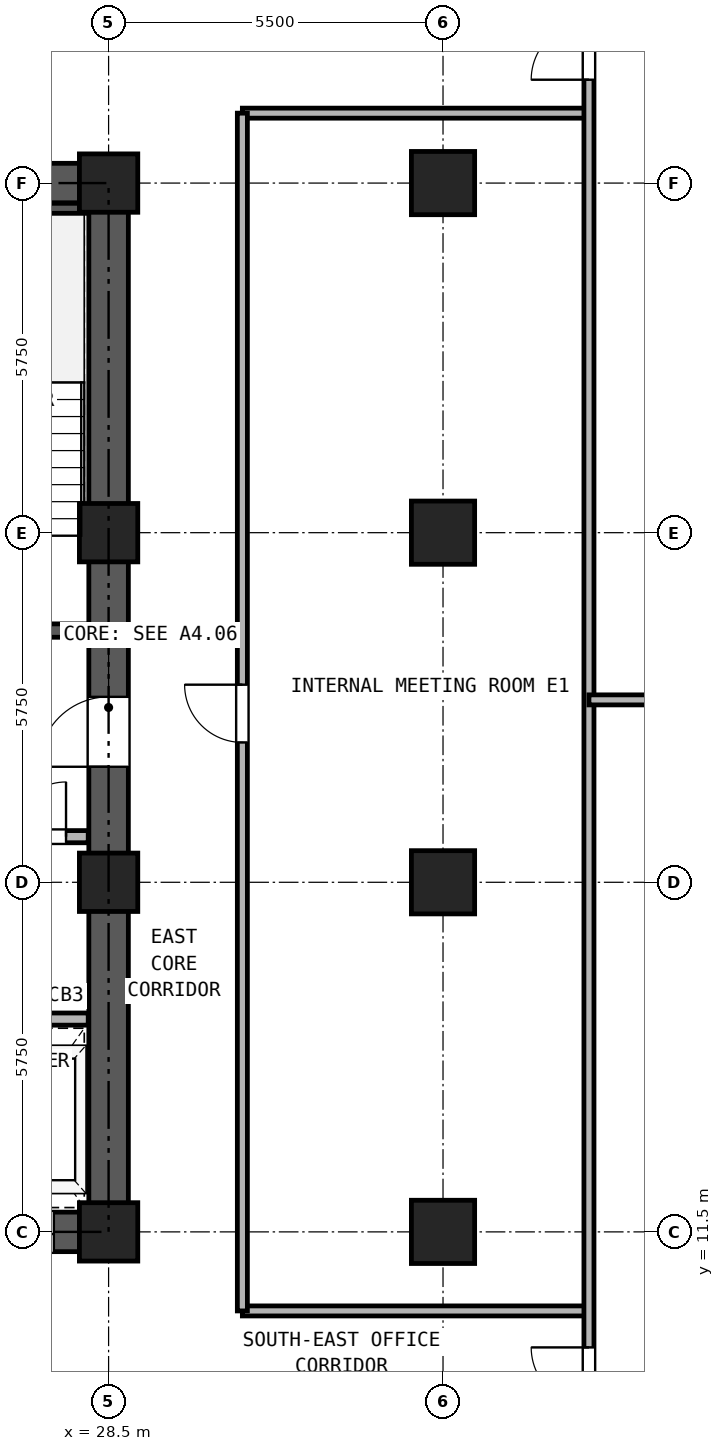
"""IFC4 building model, lengths in metres.
Left out: names, types, materials, properties, quantities, classifications, styles, units other than length and angle.
Written with IfcOpenShell. Run it as: python <this file> out.ifc"""

import sys

from ifc_helpers import new_model, si_unit, direction, frame, frame_2d, origin, origin_2d, place, context, subcontext, project, spatial, rectangle, hollow_rectangle, extrude, source, transform, mapped, element, fill, save


model = new_model("IFC4")
c1 = context("Model", 3, precision=1e-05, world=origin(), true_north=direction((0.0, 1.0)))
c2 = subcontext(c1, "Body", "Model", "MODEL_VIEW")
j1 = project(units=[si_unit("LENGTHUNIT", "METRE"), si_unit("PLANEANGLEUNIT", "RADIAN")], contexts=[c1])
p1 = place(None, origin())
s1 = spatial("IfcSite", under=j1, at=p1, CompositionType="ELEMENT")
p2 = place(p1, origin())
s2 = spatial("IfcBuilding", under=s1, at=p2, CompositionType="ELEMENT")
p3 = place(p2, frame((0.0, 0.0, 47.7)))
s3 = spatial("IfcBuildingStorey", under=s2, at=p3, CompositionType="ELEMENT", Elevation=47.7)
m1 = source(origin(), c2, "Body", "SweptSolid", [
    extrude(hollow_rectangle(XDim=0.96, YDim=0.96, WallThickness=0.06, at=origin_2d()), origin(), (0.0, 0.0, 1.0), 3.32),
])
for number, where, z_axis, x_axis in (
    (1, (28.5, 11.5, 0.0), (0.0, 0.0, 1.0), (1.0, 0.0, 0.0)),
    (2, (28.5, 17.25, 0.0), (0.0, 0.0, 1.0), (1.0, 0.0, 0.0)),
    (3, (28.5, 23.0, 0.0), (0.0, 0.0, 1.0), (1.0, 0.0, 0.0)),
    (4, (28.5, 28.75, 0.0), (0.0, 0.0, 1.0), (1.0, 0.0, 0.0)),
):
    element("IfcColumn", number, at=place(p3, frame(where, z_axis=z_axis, x_axis=x_axis)), inside=s3, PredefinedType="COLUMN", context=c2, shape_type="MappedRepresentation", body=[
        mapped(m1, transform((0.0, 0.0, 0.0), x_axis=(1.0, 0.0, 0.0), y_axis=(0.0, 1.0, 0.0), z_axis=(0.0, 0.0, 1.0), scale=1.0)),
    ])
m2 = source(origin(), c2, "Body", "SweptSolid", [
    extrude(hollow_rectangle(XDim=1.04, YDim=1.04, WallThickness=0.065, at=origin_2d()), origin(), (0.0, 0.0, 1.0), 3.32),
])
for number, where, z_axis, x_axis in (
    (5, (34.0, 11.5, 0.0), (0.0, 0.0, 1.0), (1.0, 0.0, 0.0)),
    (6, (34.0, 17.25, 0.0), (0.0, 0.0, 1.0), (1.0, 0.0, 0.0)),
    (7, (34.0, 23.0, 0.0), (0.0, 0.0, 1.0), (1.0, 0.0, 0.0)),
    (8, (34.0, 28.75, 0.0), (0.0, 0.0, 1.0), (1.0, 0.0, 0.0)),
):
    element("IfcColumn", number, at=place(p3, frame(where, z_axis=z_axis, x_axis=x_axis)), inside=s3, PredefinedType="COLUMN", context=c2, shape_type="MappedRepresentation", body=[
        mapped(m2, transform((0.0, 0.0, 0.0), x_axis=(1.0, 0.0, 0.0), y_axis=(0.0, 1.0, 0.0), z_axis=(0.0, 0.0, 1.0), scale=1.0)),
    ])
p4 = place(p3, frame((18.175, 11.5, 0.0), z_axis=(0.0, 0.0, 1.0), x_axis=(1.0, 0.0, 0.0)))
e9 = element("IfcWall", 9, at=p4, inside=s3, PredefinedType="SHEAR", context=c2, shape_type="SweptSolid", body=[
    extrude(rectangle(XDim=10.65, YDim=0.65, at=frame_2d((5.325, 0.0))), origin(), (0.0, 0.0, 1.0), 3.32),
])
p5 = place(p4, frame((1.195, 0.0, 0.0)))
e10 = element("IfcOpeningElement", 10, at=p5, cuts=e9, PredefinedType="OPENING", context=c2, shape_type="SweptSolid", body=[
    extrude(rectangle(XDim=1.1, YDim=2.25, at=frame_2d((0.55, 1.125))), frame((0.0, 0.335, 0.0), z_axis=(0.0, -1.0, 0.0), x_axis=(1.0, 0.0, 0.0)), (0.0, 0.0, 1.0), 0.67),
])
p6 = place(p4, frame((3.495, 0.0, 0.0)))
e11 = element("IfcOpeningElement", 11, at=p6, cuts=e9, PredefinedType="OPENING", context=c2, shape_type="SweptSolid", body=[
    extrude(rectangle(XDim=1.1, YDim=2.25, at=frame_2d((0.55, 1.125))), frame((0.0, 0.335, 0.0), z_axis=(0.0, -1.0, 0.0), x_axis=(1.0, 0.0, 0.0)), (0.0, 0.0, 1.0), 0.67),
])
p7 = place(p4, frame((5.925, 0.0, 0.0)))
e12 = element("IfcOpeningElement", 12, at=p7, cuts=e9, PredefinedType="OPENING", context=c2, shape_type="SweptSolid", body=[
    extrude(rectangle(XDim=1.1, YDim=2.25, at=frame_2d((0.55, 1.125))), frame((0.0, 0.335, 0.0), z_axis=(0.0, -1.0, 0.0), x_axis=(1.0, 0.0, 0.0)), (0.0, 0.0, 1.0), 0.67),
])
p8 = place(p4, frame((8.325, 0.0, 0.0)))
e13 = element("IfcOpeningElement", 13, at=p8, cuts=e9, PredefinedType="OPENING", context=c2, shape_type="SweptSolid", body=[
    extrude(rectangle(XDim=1.1, YDim=2.25, at=frame_2d((0.55, 1.125))), frame((0.0, 0.335, 0.0), z_axis=(0.0, -1.0, 0.0), x_axis=(1.0, 0.0, 0.0)), (0.0, 0.0, 1.0), 0.67),
])
p9 = place(p3, frame((18.175, 28.75, 0.0), z_axis=(0.0, 0.0, 1.0), x_axis=(1.0, 0.0, 0.0)))
e14 = element("IfcWall", 14, at=p9, inside=s3, PredefinedType="SHEAR", context=c2, shape_type="SweptSolid", body=[
    extrude(rectangle(XDim=10.65, YDim=0.65, at=frame_2d((5.325, 0.0))), origin(), (0.0, 0.0, 1.0), 3.32),
])
p10 = place(p9, frame((4.205, 0.0, 0.0)))
e15 = element("IfcOpeningElement", 15, at=p10, cuts=e14, PredefinedType="OPENING", context=c2, shape_type="SweptSolid", body=[
    extrude(rectangle(XDim=0.9, YDim=2.05, at=frame_2d((0.45, 1.025))), frame((0.0, 0.335, 0.0), z_axis=(0.0, -1.0, 0.0), x_axis=(1.0, 0.0, 0.0)), (0.0, 0.0, 1.0), 0.67),
])
p11 = place(p9, frame((5.745, 0.0, 0.0)))
e16 = element("IfcOpeningElement", 16, at=p11, cuts=e14, PredefinedType="OPENING", context=c2, shape_type="SweptSolid", body=[
    extrude(rectangle(XDim=0.9, YDim=2.05, at=frame_2d((0.45, 1.025))), frame((0.0, 0.335, 0.0), z_axis=(0.0, -1.0, 0.0), x_axis=(1.0, 0.0, 0.0)), (0.0, 0.0, 1.0), 0.67),
])
p12 = place(p3, frame((28.5, 11.825, 0.0), z_axis=(0.0, 0.0, 1.0), x_axis=(0.0, 1.0, 0.0)))
e17 = element("IfcWall", 17, at=p12, inside=s3, PredefinedType="SHEAR", context=c2, shape_type="SweptSolid", body=[
    extrude(rectangle(XDim=16.6, YDim=0.65, at=frame_2d((8.3, 0.0))), origin(), (0.0, 0.0, 1.0), 3.32),
])
p13 = place(p12, frame((7.325, 0.0, 0.0)))
e18 = element("IfcOpeningElement", 18, at=p13, cuts=e17, PredefinedType="OPENING", context=c2, shape_type="SweptSolid", body=[
    extrude(rectangle(XDim=1.15, YDim=2.2, at=frame_2d((0.575, 1.1))), frame((0.0, 0.335, 0.0), z_axis=(0.0, -1.0, 0.0), x_axis=(1.0, 0.0, 0.0)), (0.0, 0.0, 1.0), 0.67),
])
p14 = place(p3, frame((25.13, 28.335, 0.0), z_axis=(0.0, 0.0, 1.0), x_axis=(1.0, 0.0, 0.0)))
e19 = element("IfcWall", 19, at=p14, inside=s3, PredefinedType="PARTITIONING", context=c2, shape_type="SweptSolid", body=[
    extrude(rectangle(XDim=3.035, YDim=0.165, at=frame_2d((1.518, 0.0))), origin(), (0.0, 0.0, 1.0), 3.32),
])
p15 = place(p3, frame((25.13, 21.39, 0.0), z_axis=(0.0, 0.0, 1.0), x_axis=(1.0, 0.0, 0.0)))
e20 = element("IfcWall", 20, at=p15, inside=s3, PredefinedType="SOLIDWALL", context=c2, shape_type="SweptSolid", body=[
    extrude(rectangle(XDim=3.035, YDim=0.22, at=frame_2d((1.518, 0.0))), origin(), (0.0, 0.0, 1.0), 3.32),
])
p16 = place(p15, frame((0.92, 0.0, 0.0)))
e21 = element("IfcOpeningElement", 21, at=p16, cuts=e20, PredefinedType="OPENING", context=c2, shape_type="SweptSolid", body=[
    extrude(rectangle(XDim=1.15, YDim=2.2, at=frame_2d((0.575, 1.1))), frame((0.0, 0.12, 0.0), z_axis=(0.0, -1.0, 0.0), x_axis=(1.0, 0.0, 0.0)), (0.0, 0.0, 1.0), 0.24),
])
p17 = place(p3, frame((18.835, 18.0, 0.0), z_axis=(0.0, 0.0, 1.0), x_axis=(1.0, 0.0, 0.0)))
e22 = element("IfcWall", 22, at=p17, inside=s3, PredefinedType="PARTITIONING", context=c2, shape_type="SweptSolid", body=[
    extrude(rectangle(XDim=9.33, YDim=0.2, at=frame_2d((4.665, 0.0))), origin(), (0.0, 0.0, 1.0), 3.32),
])
p18 = place(p17, frame((0.415, 0.0, 0.0)))
e23 = element("IfcOpeningElement", 23, at=p18, cuts=e22, PredefinedType="OPENING", context=c2, shape_type="SweptSolid", body=[
    extrude(rectangle(XDim=1.3, YDim=2.3, at=frame_2d((0.65, 1.15))), frame((0.0, 0.11, 0.0), z_axis=(0.0, -1.0, 0.0), x_axis=(1.0, 0.0, 0.0)), (0.0, 0.0, 1.0), 0.22),
])
p19 = place(p17, frame((2.515, 0.0, 0.0)))
e24 = element("IfcOpeningElement", 24, at=p19, cuts=e22, PredefinedType="OPENING", context=c2, shape_type="SweptSolid", body=[
    extrude(rectangle(XDim=1.3, YDim=2.3, at=frame_2d((0.65, 1.15))), frame((0.0, 0.11, 0.0), z_axis=(0.0, -1.0, 0.0), x_axis=(1.0, 0.0, 0.0)), (0.0, 0.0, 1.0), 0.22),
])
p20 = place(p17, frame((4.935, 0.0, 0.0)))
e25 = element("IfcOpeningElement", 25, at=p20, cuts=e22, PredefinedType="OPENING", context=c2, shape_type="SweptSolid", body=[
    extrude(rectangle(XDim=0.9, YDim=2.05, at=frame_2d((0.45, 1.025))), frame((0.0, 0.11, 0.0), z_axis=(0.0, -1.0, 0.0), x_axis=(1.0, 0.0, 0.0)), (0.0, 0.0, 1.0), 0.22),
])
p21 = place(p17, frame((8.065, 0.0, 0.0)))
e26 = element("IfcOpeningElement", 26, at=p21, cuts=e22, PredefinedType="OPENING", context=c2, shape_type="SweptSolid", body=[
    extrude(rectangle(XDim=0.9, YDim=2.05, at=frame_2d((0.45, 1.025))), frame((0.0, 0.11, 0.0), z_axis=(0.0, -1.0, 0.0), x_axis=(1.0, 0.0, 0.0)), (0.0, 0.0, 1.0), 0.22),
])
p22 = place(p3, frame((18.835, 15.0, 0.0), z_axis=(0.0, 0.0, 1.0), x_axis=(1.0, 0.0, 0.0)))
e27 = element("IfcWall", 27, at=p22, inside=s3, PredefinedType="PARTITIONING", context=c2, shape_type="SweptSolid", body=[
    extrude(rectangle(XDim=9.33, YDim=0.2, at=frame_2d((4.665, 0.0))), origin(), (0.0, 0.0, 1.0), 3.32),
])
for number, where, z_axis, x_axis in (
    (28, (30.7, 10.2, 0.0), (0.0, 0.0, 1.0), (1.0, 0.0, 0.0)),
    (29, (30.7, 29.9, 0.0), (0.0, 0.0, 1.0), (1.0, 0.0, 0.0)),
):
    element("IfcWall", number, at=place(p3, frame(where, z_axis=z_axis, x_axis=x_axis)), inside=s3, PredefinedType="PARTITIONING", context=c2, shape_type="SweptSolid", body=[
        extrude(rectangle(XDim=5.7, YDim=0.165, at=frame_2d((2.85, 0.0))), origin(), (0.0, 0.0, 1.0), 3.32),
    ])
p23 = place(p3, frame((30.7, 10.2, 0.0), z_axis=(0.0, 0.0, 1.0), x_axis=(0.0, 1.0, 0.0)))
e30 = element("IfcWall", 30, at=p23, inside=s3, PredefinedType="PARTITIONING", context=c2, shape_type="SweptSolid", body=[
    extrude(rectangle(XDim=19.7, YDim=0.165, at=frame_2d((9.85, 0.0))), origin(), (0.0, 0.0, 1.0), 3.32),
])
p24 = place(p23, frame((9.35, 0.0, 0.0)))
e31 = element("IfcOpeningElement", 31, at=p24, cuts=e30, PredefinedType="OPENING", context=c2, shape_type="SweptSolid", body=[
    extrude(rectangle(XDim=0.95, YDim=2.15, at=frame_2d((0.475, 1.075))), frame((0.0, 0.093, 0.0), z_axis=(0.0, -1.0, 0.0), x_axis=(1.0, 0.0, 0.0)), (0.0, 0.0, 1.0), 0.185),
])
p25 = place(p3, frame((36.4, 0.16, 0.0), z_axis=(0.0, 0.0, 1.0), x_axis=(0.0, 1.0, 0.0)))
e32 = element("IfcWall", 32, at=p25, inside=s3, PredefinedType="PARTITIONING", context=c2, shape_type="SweptSolid", body=[
    extrude(rectangle(XDim=40.18, YDim=0.165, at=frame_2d((20.09, 0.0))), origin(), (0.0, 0.0, 1.0), 3.32),
])
p26 = place(p25, frame((8.49, 0.0, 0.0)))
e33 = element("IfcOpeningElement", 33, at=p26, cuts=e32, PredefinedType="OPENING", context=c2, shape_type="SweptSolid", body=[
    extrude(rectangle(XDim=0.95, YDim=2.15, at=frame_2d((0.475, 1.075))), frame((0.0, 0.093, 0.0), z_axis=(0.0, -1.0, 0.0), x_axis=(1.0, 0.0, 0.0)), (0.0, 0.0, 1.0), 0.185),
])
p27 = place(p25, frame((30.29, 0.0, 0.0)))
e34 = element("IfcOpeningElement", 34, at=p27, cuts=e32, PredefinedType="OPENING", context=c2, shape_type="SweptSolid", body=[
    extrude(rectangle(XDim=0.95, YDim=2.15, at=frame_2d((0.475, 1.075))), frame((0.0, 0.093, 0.0), z_axis=(0.0, -1.0, 0.0), x_axis=(1.0, 0.0, 0.0)), (0.0, 0.0, 1.0), 0.185),
])
p28 = place(p3, frame((36.4, 20.25, 0.0), z_axis=(0.0, 0.0, 1.0), x_axis=(1.0, 0.0, 0.0)))
e35 = element("IfcWall", 35, at=p28, inside=s3, PredefinedType="PARTITIONING", context=c2, shape_type="SweptSolid", body=[
    extrude(rectangle(XDim=10.44, YDim=0.165, at=frame_2d((5.22, 0.0))), origin(), (0.0, 0.0, 1.0), 2.898),
])
p29 = place(p21, frame((0.9, 0.0, 0.0), z_axis=(0.0, 0.0, 1.0), x_axis=(-1.0, 0.0, 0.0)))
e36 = element("IfcDoor", 36, at=p29, inside=s3, OperationType="SINGLE_SWING_RIGHT", PredefinedType="DOOR", context=c2, shape_type="SweptSolid", body=[
    extrude(rectangle(XDim=0.9, YDim=2.05, at=frame_2d((0.45, 1.025))), frame((0.0, 0.025, 0.0), z_axis=(0.0, -1.0, 0.0), x_axis=(1.0, 0.0, 0.0)), (0.0, 0.0, 1.0), 0.05),
])
fill(e26, e36)
p30 = place(p13, origin())
e37 = element("IfcDoor", 37, at=p30, inside=s3, OperationType="SINGLE_SWING_LEFT", PredefinedType="DOOR", context=c2, shape_type="SweptSolid", body=[
    extrude(rectangle(XDim=1.15, YDim=2.2, at=frame_2d((0.575, 1.1))), frame((0.0, 0.025, 0.0), z_axis=(0.0, -1.0, 0.0), x_axis=(1.0, 0.0, 0.0)), (0.0, 0.0, 1.0), 0.05),
])
fill(e18, e37)
p31 = place(p8, frame((1.1, 0.0, 0.0), z_axis=(0.0, 0.0, 1.0), x_axis=(-1.0, 0.0, 0.0)))
e38 = element("IfcDoor", 38, at=p31, inside=s3, OperationType="DOUBLE_DOOR_SLIDING", PredefinedType="DOOR", context=c2, shape_type="SweptSolid", body=[
    extrude(rectangle(XDim=1.1, YDim=2.25, at=frame_2d((0.55, 1.125))), frame((0.0, 0.025, 0.0), z_axis=(0.0, -1.0, 0.0), x_axis=(1.0, 0.0, 0.0)), (0.0, 0.0, 1.0), 0.05),
])
fill(e13, e38)
p32 = place(p26, origin())
e39 = element("IfcDoor", 39, at=p32, inside=s3, OperationType="SINGLE_SWING_RIGHT", PredefinedType="DOOR", context=c2, shape_type="SweptSolid", body=[
    extrude(rectangle(XDim=0.95, YDim=2.15, at=frame_2d((0.475, 1.075))), frame((0.0, 0.025, 0.0), z_axis=(0.0, -1.0, 0.0), x_axis=(1.0, 0.0, 0.0)), (0.0, 0.0, 1.0), 0.05),
])
fill(e33, e39)
p33 = place(p27, origin())
e40 = element("IfcDoor", 40, at=p33, inside=s3, OperationType="SINGLE_SWING_LEFT", PredefinedType="DOOR", context=c2, shape_type="SweptSolid", body=[
    extrude(rectangle(XDim=0.95, YDim=2.15, at=frame_2d((0.475, 1.075))), frame((0.0, 0.025, 0.0), z_axis=(0.0, -1.0, 0.0), x_axis=(1.0, 0.0, 0.0)), (0.0, 0.0, 1.0), 0.05),
])
fill(e34, e40)
p34 = place(p24, origin())
e41 = element("IfcDoor", 41, at=p34, inside=s3, OperationType="SINGLE_SWING_RIGHT", PredefinedType="DOOR", context=c2, shape_type="SweptSolid", body=[
    extrude(rectangle(XDim=0.95, YDim=2.15, at=frame_2d((0.475, 1.075))), frame((0.0, 0.025, 0.0), z_axis=(0.0, -1.0, 0.0), x_axis=(1.0, 0.0, 0.0)), (0.0, 0.0, 1.0), 0.05),
])
fill(e31, e41)
save(model, sys.argv[1])
